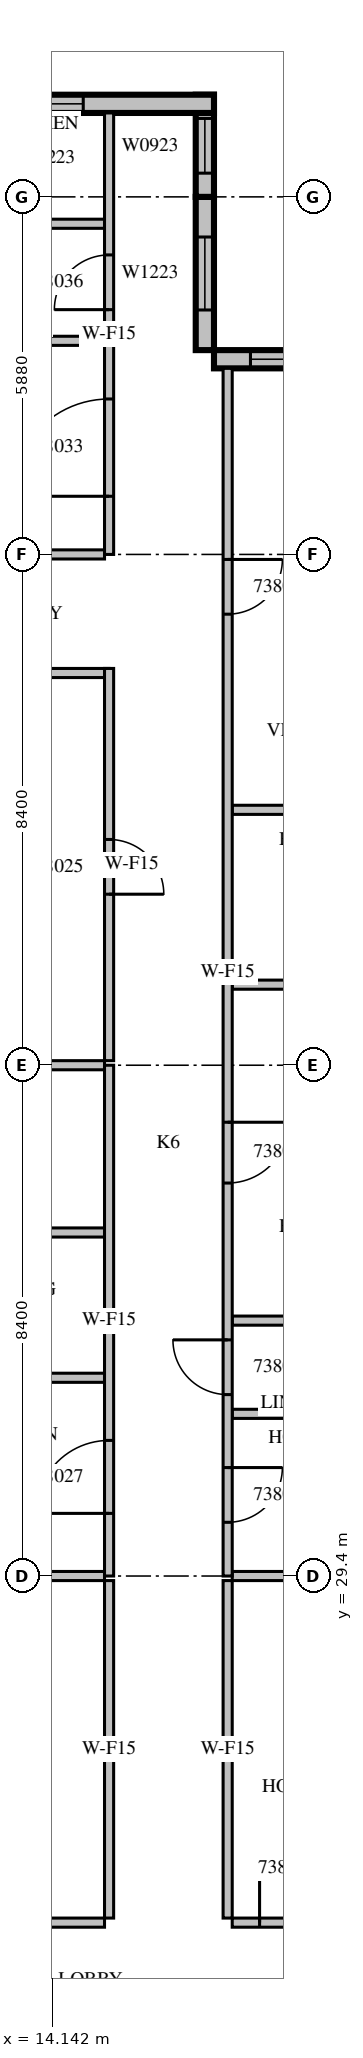
"""IFC4 building model, lengths in metres.
Left out: names, types, materials, properties, quantities, classifications, styles, units other than length and angle.
Written with IfcOpenShell. Run it as: python <this file> out.ifc"""

import sys

from ifc_helpers import new_model, si_unit, direction, frame, frame_2d, origin, place, context, subcontext, project, spatial, rectangle, extrude, source, transform, mapped, element, fill, save


model = new_model("IFC4")
c1 = context("Model", 3, precision=1e-05, world=origin(), true_north=direction((0.0, 1.0)))
c2 = subcontext(c1, "Body", "Model", "MODEL_VIEW")
j1 = project(units=[si_unit("LENGTHUNIT", "METRE"), si_unit("PLANEANGLEUNIT", "RADIAN")], contexts=[c1])
p1 = place(None, origin())
s1 = spatial("IfcSite", under=j1, at=p1, CompositionType="ELEMENT")
p2 = place(p1, origin())
s2 = spatial("IfcBuilding", under=s1, at=p2, CompositionType="ELEMENT")
p3 = place(p2, frame((0.0, 0.0, 177.8)))
s3 = spatial("IfcBuildingStorey", under=s2, at=p3, CompositionType="ELEMENT", Elevation=177.8)
m1 = source(origin(), c2, "Body", "SweptSolid", [
    extrude(rectangle(XDim=4.2, YDim=0.3, at=frame_2d((2.1, 0.0))), origin(), (0.0, 0.0, 1.0), 3.4),
])
p4 = place(p3, frame((21.0, 49.41, 0.0), z_axis=(0.0, 0.0, 1.0), x_axis=(-1.0, 0.0, 0.0)))
e1 = element("IfcWall", 1, at=p4, inside=s3, PredefinedType="STANDARD", context=c2, shape_type="MappedRepresentation", body=[
    mapped(m1, transform((0.0, 0.0, 0.0), scale=1.0)),
])
m2 = source(origin(), c2, "Body", "SweptSolid", [
    extrude(rectangle(XDim=3.0, YDim=2.3, at=frame_2d((1.5, 1.15))), frame((0.0, 0.16, 0.0), z_axis=(0.0, -1.0, 0.0), x_axis=(1.0, 0.0, 0.0)), (0.0, 0.0, 1.0), 0.32),
])
p5 = place(p4, frame((0.6, 0.0, 0.6)))
e2 = element("IfcOpeningElement", 2, at=p5, cuts=e1, PredefinedType="OPENING", context=c2, shape_type="MappedRepresentation", body=[
    mapped(m2, transform((0.0, 0.0, 0.0), scale=1.0)),
])
m3 = source(origin(), c2, "Body", "SweptSolid", [
    extrude(rectangle(XDim=2.52, YDim=0.3, at=frame_2d((1.26, 0.0))), origin(), (0.0, 0.0, 1.0), 3.4),
])
p6 = place(p3, frame((16.65, 49.56, 0.0), z_axis=(0.0, 0.0, 1.0), x_axis=(0.0, 1.0, 0.0)))
e3 = element("IfcWall", 3, at=p6, inside=s3, PredefinedType="STANDARD", context=c2, shape_type="MappedRepresentation", body=[
    mapped(m3, transform((0.0, 0.0, 0.0), scale=1.0)),
])
m4 = source(origin(), c2, "Body", "SweptSolid", [
    extrude(rectangle(XDim=1.2, YDim=2.3, at=frame_2d((0.6, 1.15))), frame((0.0, 0.16, 0.0), z_axis=(0.0, -1.0, 0.0), x_axis=(1.0, 0.0, 0.0)), (0.0, 0.0, 1.0), 0.32),
])
p7 = place(p6, frame((0.66, 0.0, 0.6)))
e4 = element("IfcOpeningElement", 4, at=p7, cuts=e3, PredefinedType="OPENING", context=c2, shape_type="MappedRepresentation", body=[
    mapped(m4, transform((0.0, 0.0, 0.0), scale=1.0)),
])
m5 = source(origin(), c2, "Body", "SweptSolid", [
    extrude(rectangle(XDim=1.68, YDim=0.3, at=frame_2d((0.84, 0.0))), origin(), (0.0, 0.0, 1.0), 3.4),
])
p8 = place(p3, frame((16.65, 52.08, 0.0), z_axis=(0.0, 0.0, 1.0), x_axis=(0.0, 1.0, 0.0)))
e5 = element("IfcWall", 5, at=p8, inside=s3, PredefinedType="STANDARD", context=c2, shape_type="MappedRepresentation", body=[
    mapped(m5, transform((0.0, 0.0, 0.0), scale=1.0)),
])
m6 = source(origin(), c2, "Body", "SweptSolid", [
    extrude(rectangle(XDim=0.9, YDim=2.3, at=frame_2d((0.45, 1.15))), frame((0.0, 0.16, 0.0), z_axis=(0.0, -1.0, 0.0), x_axis=(1.0, 0.0, 0.0)), (0.0, 0.0, 1.0), 0.32),
])
p9 = place(p8, frame((0.39, 0.0, 0.6)))
e6 = element("IfcOpeningElement", 6, at=p9, cuts=e5, PredefinedType="OPENING", context=c2, shape_type="MappedRepresentation", body=[
    mapped(m6, transform((0.0, 0.0, 0.0), scale=1.0)),
])
p10 = place(p3, frame((16.8, 53.61, 0.0), z_axis=(0.0, 0.0, 1.0), x_axis=(-1.0, 0.0, 0.0)))
e7 = element("IfcWall", 7, at=p10, inside=s3, PredefinedType="STANDARD", context=c2, shape_type="SweptSolid", body=[
    extrude(rectangle(XDim=10.5, YDim=0.3, at=frame_2d((5.25, 0.0))), origin(), (0.0, 0.0, 1.0), 3.4),
])
p11 = place(p10, frame((2.15, 0.0, 0.6)))
e8 = element("IfcOpeningElement", 8, at=p11, cuts=e7, PredefinedType="OPENING", context=c2, shape_type="MappedRepresentation", body=[
    mapped(m4, transform((0.0, 0.0, 0.0), scale=1.0)),
])
m7 = source(origin(), c2, "Body", "SweptSolid", [
    extrude(rectangle(XDim=1.8, YDim=2.3, at=frame_2d((0.9, 1.15))), frame((0.0, 0.16, 0.0), z_axis=(0.0, -1.0, 0.0), x_axis=(1.0, 0.0, 0.0)), (0.0, 0.0, 1.0), 0.32),
])
p12 = place(p10, frame((8.025, 0.0, 0.6)))
e9 = element("IfcOpeningElement", 9, at=p12, cuts=e7, PredefinedType="OPENING", context=c2, shape_type="MappedRepresentation", body=[
    mapped(m7, transform((0.0, 0.0, 0.0), scale=1.0)),
])
p13 = place(p3, frame((6.505, 23.7, 0.0), z_axis=(0.0, 0.0, 1.0), x_axis=(1.0, 0.0, 0.0)))
e10 = element("IfcWall", 10, at=p13, inside=s3, PredefinedType="PARTITIONING", context=c2, shape_type="SweptSolid", body=[
    extrude(rectangle(XDim=8.495, YDim=0.15, at=frame_2d((4.247, 0.0))), origin(), (0.0, 0.0, 1.0), 3.4),
])
m8 = source(origin(), c2, "Body", "SweptSolid", [
    extrude(rectangle(XDim=0.9, YDim=2.1, at=frame_2d((0.45, 1.05))), frame((0.0, 0.085, 0.0), z_axis=(0.0, -1.0, 0.0), x_axis=(1.0, 0.0, 0.0)), (0.0, 0.0, 1.0), 0.17),
])
p14 = place(p13, frame((1.395, 0.0, 0.0)))
e11 = element("IfcOpeningElement", 11, at=p14, cuts=e10, PredefinedType="OPENING", context=c2, shape_type="MappedRepresentation", body=[
    mapped(m8, transform((0.0, 0.0, 0.0), scale=1.0)),
])
p15 = place(p13, frame((6.47, 0.0, 0.0)))
e12 = element("IfcOpeningElement", 12, at=p15, cuts=e10, PredefinedType="OPENING", context=c2, shape_type="MappedRepresentation", body=[
    mapped(m8, transform((0.0, 0.0, 0.0), scale=1.0)),
])
m9 = source(origin(), c2, "Body", "SweptSolid", [
    extrude(rectangle(XDim=3.6, YDim=0.15, at=frame_2d((1.8, 0.0))), origin(), (0.0, 0.0, 1.0), 3.4),
])
p16 = place(p3, frame((17.1, 23.7, 0.0), z_axis=(0.0, 0.0, 1.0), x_axis=(1.0, 0.0, 0.0)))
e13 = element("IfcWall", 13, at=p16, inside=s3, PredefinedType="PARTITIONING", context=c2, shape_type="MappedRepresentation", body=[
    mapped(m9, transform((0.0, 0.0, 0.0), scale=1.0)),
])
p17 = place(p16, frame((0.45, 0.0, 0.0)))
e14 = element("IfcOpeningElement", 14, at=p17, cuts=e13, PredefinedType="OPENING", context=c2, shape_type="MappedRepresentation", body=[
    mapped(m8, transform((0.0, 0.0, 0.0), scale=1.0)),
])
m10 = source(origin(), c2, "Body", "SweptSolid", [
    extrude(rectangle(XDim=5.55, YDim=0.15, at=frame_2d((2.775, 0.0))), origin(), (0.0, 0.0, 1.0), 3.4),
])
for number, where, z_axis, x_axis in (
    (15, (15.075, 23.775, 0.0), (0.0, 0.0, 1.0), (0.0, 1.0, 0.0)),
    (16, (17.025, 29.325, 0.0), (0.0, 0.0, 1.0), (0.0, -1.0, 0.0)),
):
    element("IfcWall", number, at=place(p3, frame(where, z_axis=z_axis, x_axis=x_axis)), inside=s3, PredefinedType="PARTITIONING", context=c2, shape_type="MappedRepresentation", body=[
        mapped(m10, transform((0.0, 0.0, 0.0), scale=1.0)),
    ])
m11 = source(origin(), c2, "Body", "SweptSolid", [
    extrude(rectangle(XDim=4.051, YDim=0.15, at=frame_2d((2.026, 0.0))), origin(), (0.0, 0.0, 1.0), 3.4),
])
p18 = place(p3, frame((15.0, 29.4, 0.0), z_axis=(0.0, 0.0, 1.0), x_axis=(-1.0, 0.0, 0.0)))
e17 = element("IfcWall", 17, at=p18, inside=s3, PredefinedType="PARTITIONING", context=c2, shape_type="MappedRepresentation", body=[
    mapped(m11, transform((0.0, 0.0, 0.0), scale=1.0)),
])
m12 = source(origin(), c2, "Body", "SweptSolid", [
    extrude(rectangle(XDim=3.001, YDim=0.15, at=frame_2d((1.5, 0.0))), origin(), (0.0, 0.0, 1.0), 3.4),
])
p19 = place(p3, frame((20.101, 29.4, 0.0), z_axis=(0.0, 0.0, 1.0), x_axis=(-1.0, 0.0, 0.0)))
e18 = element("IfcWall", 18, at=p19, inside=s3, PredefinedType="PARTITIONING", context=c2, shape_type="MappedRepresentation", body=[
    mapped(m12, transform((0.0, 0.0, 0.0), scale=1.0)),
])
p20 = place(p3, frame((15.075, 44.25, 0.0), z_axis=(0.0, 0.0, 1.0), x_axis=(-1.0, 0.0, 0.0)))
e19 = element("IfcWall", 19, at=p20, inside=s3, PredefinedType="PARTITIONING", context=c2, shape_type="SweptSolid", body=[
    extrude(rectangle(XDim=3.575, YDim=0.15, at=frame_2d((1.788, 0.0))), origin(), (0.0, 0.0, 1.0), 3.4),
])
m13 = source(origin(), c2, "Body", "SweptSolid", [
    extrude(rectangle(XDim=6.45, YDim=0.15, at=frame_2d((3.225, 0.0))), origin(), (0.0, 0.0, 1.0), 3.4),
])
p21 = place(p3, frame((15.075, 37.875, 0.0), z_axis=(0.0, 0.0, 1.0), x_axis=(0.0, 1.0, 0.0)))
e20 = element("IfcWall", 20, at=p21, inside=s3, PredefinedType="PARTITIONING", context=c2, shape_type="MappedRepresentation", body=[
    mapped(m13, transform((0.0, 0.0, 0.0), scale=1.0)),
])
p22 = place(p21, frame((2.737, 0.0, 0.0)))
e21 = element("IfcOpeningElement", 21, at=p22, cuts=e20, PredefinedType="OPENING", context=c2, shape_type="MappedRepresentation", body=[
    mapped(m8, transform((0.0, 0.0, 0.0), scale=1.0)),
])
m14 = source(origin(), c2, "Body", "SweptSolid", [
    extrude(rectangle(XDim=3.9, YDim=0.15, at=frame_2d((1.95, 0.0))), origin(), (0.0, 0.0, 1.0), 3.4),
])
for number, where, z_axis, x_axis in (
    (22, (15.0, 32.66, 0.0), (0.0, 0.0, 1.0), (-1.0, 0.0, 0.0)),
    (23, (15.0, 35.049, 0.0), (0.0, 0.0, 1.0), (-1.0, 0.0, 0.0)),
    (24, (15.0, 37.8, 0.0), (0.0, 0.0, 1.0), (-1.0, 0.0, 0.0)),
    (25, (15.0, 49.713, 0.0), (0.0, 0.0, 1.0), (-1.0, 0.0, 0.0)),
):
    element("IfcWall", number, at=place(p3, frame(where, z_axis=z_axis, x_axis=x_axis)), inside=s3, PredefinedType="PARTITIONING", context=c2, shape_type="MappedRepresentation", body=[
        mapped(m14, transform((0.0, 0.0, 0.0), scale=1.0)),
    ])
p23 = place(p3, frame((15.0, 51.638, 0.0), z_axis=(0.0, 0.0, 1.0), x_axis=(-1.0, 0.0, 0.0)))
e26 = element("IfcWall", 26, at=p23, inside=s3, PredefinedType="PARTITIONING", context=c2, shape_type="MappedRepresentation", body=[
    mapped(m14, transform((0.0, 0.0, 0.0), scale=1.0)),
])
p24 = place(p23, frame((1.5, 0.0, 0.0)))
e27 = element("IfcOpeningElement", 27, at=p24, cuts=e26, PredefinedType="OPENING", context=c2, shape_type="MappedRepresentation", body=[
    mapped(m8, transform((0.0, 0.0, 0.0), scale=1.0)),
])
p25 = place(p3, frame((15.0, 46.2, 0.0), z_axis=(0.0, 0.0, 1.0), x_axis=(-1.0, 0.0, 0.0)))
e28 = element("IfcWall", 28, at=p25, inside=s3, PredefinedType="PARTITIONING", context=c2, shape_type="MappedRepresentation", body=[
    mapped(m14, transform((0.0, 0.0, 0.0), scale=1.0)),
])
p26 = place(p3, frame((17.1, 32.067, 0.0), z_axis=(0.0, 0.0, 1.0), x_axis=(1.0, 0.0, 0.0)))
e29 = element("IfcWall", 29, at=p26, inside=s3, PredefinedType="PARTITIONING", context=c2, shape_type="MappedRepresentation", body=[
    mapped(m9, transform((0.0, 0.0, 0.0), scale=1.0)),
])
p27 = place(p3, frame((17.1, 39.125, 0.0), z_axis=(0.0, 0.0, 1.0), x_axis=(1.0, 0.0, 0.0)))
e30 = element("IfcWall", 30, at=p27, inside=s3, PredefinedType="PARTITIONING", context=c2, shape_type="MappedRepresentation", body=[
    mapped(m9, transform((0.0, 0.0, 0.0), scale=1.0)),
])
p28 = place(p27, frame((1.35, 0.0, 0.0)))
e31 = element("IfcOpeningElement", 31, at=p28, cuts=e30, PredefinedType="OPENING", context=c2, shape_type="MappedRepresentation", body=[
    mapped(m8, transform((0.0, 0.0, 0.0), scale=1.0)),
])
for number, where, z_axis, x_axis in (
    (32, (20.7, 33.6, 0.0), (0.0, 0.0, 1.0), (-1.0, 0.0, 0.0)),
    (33, (20.7, 42.0, 0.0), (0.0, 0.0, 1.0), (-1.0, 0.0, 0.0)),
):
    element("IfcWall", number, at=place(p3, frame(where, z_axis=z_axis, x_axis=x_axis)), inside=s3, PredefinedType="PARTITIONING", context=c2, shape_type="MappedRepresentation", body=[
        mapped(m9, transform((0.0, 0.0, 0.0), scale=1.0)),
    ])
m15 = source(origin(), c2, "Body", "SweptSolid", [
    extrude(rectangle(XDim=8.4, YDim=0.15, at=frame_2d((4.2, 0.0))), origin(), (0.0, 0.0, 1.0), 3.4),
])
p29 = place(p3, frame((15.075, 29.4, 0.0), z_axis=(0.0, 0.0, 1.0), x_axis=(0.0, 1.0, 0.0)))
e34 = element("IfcWall", 34, at=p29, inside=s3, PredefinedType="PARTITIONING", context=c2, shape_type="MappedRepresentation", body=[
    mapped(m15, transform((0.0, 0.0, 0.0), scale=1.0)),
])
m16 = source(origin(), c2, "Body", "SweptSolid", [
    extrude(rectangle(XDim=1.2, YDim=2.1, at=frame_2d((0.6, 1.05))), frame((0.0, 0.085, 0.0), z_axis=(0.0, -1.0, 0.0), x_axis=(1.0, 0.0, 0.0)), (0.0, 0.0, 1.0), 0.17),
])
p30 = place(p29, frame((1.03, 0.0, 0.0)))
e35 = element("IfcOpeningElement", 35, at=p30, cuts=e34, PredefinedType="OPENING", context=c2, shape_type="MappedRepresentation", body=[
    mapped(m16, transform((0.0, 0.0, 0.0), scale=1.0)),
])
m17 = source(origin(), c2, "Body", "SweptSolid", [
    extrude(rectangle(XDim=7.26, YDim=0.15, at=frame_2d((3.63, 0.0))), origin(), (0.0, 0.0, 1.0), 3.4),
])
p31 = place(p3, frame((15.075, 46.2, 0.0), z_axis=(0.0, 0.0, 1.0), x_axis=(0.0, 1.0, 0.0)))
e36 = element("IfcWall", 36, at=p31, inside=s3, PredefinedType="PARTITIONING", context=c2, shape_type="MappedRepresentation", body=[
    mapped(m17, transform((0.0, 0.0, 0.0), scale=1.0)),
])
p32 = place(p31, frame((0.956, 0.0, 0.0)))
e37 = element("IfcOpeningElement", 37, at=p32, cuts=e36, PredefinedType="OPENING", context=c2, shape_type="SweptSolid", body=[
    extrude(rectangle(XDim=1.6, YDim=2.1, at=frame_2d((0.8, 1.05))), frame((0.0, 0.085, 0.0), z_axis=(0.0, -1.0, 0.0), x_axis=(1.0, 0.0, 0.0)), (0.0, 0.0, 1.0), 0.17),
])
p33 = place(p31, frame((4.025, 0.0, 0.0)))
e38 = element("IfcOpeningElement", 38, at=p33, cuts=e36, PredefinedType="OPENING", context=c2, shape_type="MappedRepresentation", body=[
    mapped(m8, transform((0.0, 0.0, 0.0), scale=1.0)),
])
p34 = place(p3, frame((17.025, 49.26, 0.0), z_axis=(0.0, 0.0, 1.0), x_axis=(0.0, -1.0, 0.0)))
e39 = element("IfcWall", 39, at=p34, inside=s3, PredefinedType="PARTITIONING", context=c2, shape_type="SweptSolid", body=[
    extrude(rectangle(XDim=19.86, YDim=0.15, at=frame_2d((9.93, 0.0))), origin(), (0.0, 0.0, 1.0), 3.4),
])
p35 = place(p34, frame((18.076, 0.0, 0.0)))
e40 = element("IfcOpeningElement", 40, at=p35, cuts=e39, PredefinedType="OPENING", context=c2, shape_type="MappedRepresentation", body=[
    mapped(m8, transform((0.0, 0.0, 0.0), scale=1.0)),
])
p36 = place(p34, frame((15.976, 0.0, 0.0)))
e41 = element("IfcOpeningElement", 41, at=p36, cuts=e39, PredefinedType="OPENING", context=c2, shape_type="MappedRepresentation", body=[
    mapped(m8, transform((0.0, 0.0, 0.0), scale=1.0)),
])
m18 = source(origin(), c2, "Body", "SweptSolid", [
    extrude(rectangle(XDim=1.0, YDim=2.1, at=frame_2d((0.5, 1.05))), frame((0.0, 0.085, 0.0), z_axis=(0.0, -1.0, 0.0), x_axis=(1.0, 0.0, 0.0)), (0.0, 0.0, 1.0), 0.17),
])
p37 = place(p34, frame((12.398, 0.0, 0.0)))
e42 = element("IfcOpeningElement", 42, at=p37, cuts=e39, PredefinedType="OPENING", context=c2, shape_type="MappedRepresentation", body=[
    mapped(m18, transform((0.0, 0.0, 0.0), scale=1.0)),
])
p38 = place(p34, frame((3.143, 0.0, 0.0)))
e43 = element("IfcOpeningElement", 43, at=p38, cuts=e39, PredefinedType="OPENING", context=c2, shape_type="MappedRepresentation", body=[
    mapped(m8, transform((0.0, 0.0, 0.0), scale=1.0)),
])
m19 = source(origin(), c2, "Body", "SweptSolid", [
    extrude(rectangle(XDim=3.0, YDim=2.3, at=frame_2d((1.5, 1.15))), frame((0.0, 0.03, 0.0), z_axis=(0.0, -1.0, 0.0), x_axis=(1.0, 0.0, 0.0)), (0.0, 0.0, 1.0), 0.06),
])
p39 = place(p5, origin())
e44 = element("IfcWindow", 44, at=p39, inside=s3, PartitioningType="SINGLE_PANEL", PredefinedType="WINDOW", context=c2, shape_type="MappedRepresentation", body=[
    mapped(m19, transform((0.0, 0.0, 0.0), scale=1.0)),
])
fill(e2, e44)
m20 = source(origin(), c2, "Body", "SweptSolid", [
    extrude(rectangle(XDim=1.2, YDim=2.3, at=frame_2d((0.6, 1.15))), frame((0.0, 0.03, 0.0), z_axis=(0.0, -1.0, 0.0), x_axis=(1.0, 0.0, 0.0)), (0.0, 0.0, 1.0), 0.06),
])
p40 = place(p7, origin())
e45 = element("IfcWindow", 45, at=p40, inside=s3, PartitioningType="SINGLE_PANEL", PredefinedType="WINDOW", context=c2, shape_type="MappedRepresentation", body=[
    mapped(m20, transform((0.0, 0.0, 0.0), scale=1.0)),
])
fill(e4, e45)
m21 = source(origin(), c2, "Body", "SweptSolid", [
    extrude(rectangle(XDim=0.9, YDim=2.3, at=frame_2d((0.45, 1.15))), frame((0.0, 0.03, 0.0), z_axis=(0.0, -1.0, 0.0), x_axis=(1.0, 0.0, 0.0)), (0.0, 0.0, 1.0), 0.06),
])
p41 = place(p9, origin())
e46 = element("IfcWindow", 46, at=p41, inside=s3, PartitioningType="SINGLE_PANEL", PredefinedType="WINDOW", context=c2, shape_type="MappedRepresentation", body=[
    mapped(m21, transform((0.0, 0.0, 0.0), scale=1.0)),
])
fill(e6, e46)
p42 = place(p11, origin())
e47 = element("IfcWindow", 47, at=p42, inside=s3, PartitioningType="SINGLE_PANEL", PredefinedType="WINDOW", context=c2, shape_type="MappedRepresentation", body=[
    mapped(m20, transform((0.0, 0.0, 0.0), scale=1.0)),
])
fill(e8, e47)
m22 = source(origin(), c2, "Body", "SweptSolid", [
    extrude(rectangle(XDim=0.9, YDim=2.1, at=frame_2d((0.45, 1.05))), frame((0.0, 0.025, 0.0), z_axis=(0.0, -1.0, 0.0), x_axis=(1.0, 0.0, 0.0)), (0.0, 0.0, 1.0), 0.05),
])
p43 = place(p17, origin())
e48 = element("IfcDoor", 48, at=p43, inside=s3, OperationType="SINGLE_SWING_LEFT", PredefinedType="DOOR", context=c2, shape_type="MappedRepresentation", body=[
    mapped(m22, transform((0.0, 0.0, 0.0), scale=1.0)),
])
fill(e14, e48)
p44 = place(p22, origin())
e49 = element("IfcDoor", 49, at=p44, inside=s3, OperationType="SINGLE_SWING_RIGHT", PredefinedType="DOOR", context=c2, shape_type="MappedRepresentation", body=[
    mapped(m22, transform((0.0, 0.0, 0.0), scale=1.0)),
])
fill(e21, e49)
m23 = source(origin(), c2, "Body", "SweptSolid", [
    extrude(rectangle(XDim=1.2, YDim=2.1, at=frame_2d((0.6, 1.05))), frame((0.0, 0.025, 0.0), z_axis=(0.0, -1.0, 0.0), x_axis=(1.0, 0.0, 0.0)), (0.0, 0.0, 1.0), 0.05),
])
p45 = place(p30, origin())
e50 = element("IfcDoor", 50, at=p45, inside=s3, OperationType="SINGLE_SWING_LEFT", PredefinedType="DOOR", context=c2, shape_type="MappedRepresentation", body=[
    mapped(m23, transform((0.0, 0.0, 0.0), scale=1.0)),
])
fill(e35, e50)
p46 = place(p32, origin())
e51 = element("IfcDoor", 51, at=p46, inside=s3, OperationType="SINGLE_SWING_LEFT", PredefinedType="DOOR", context=c2, shape_type="SweptSolid", body=[
    extrude(rectangle(XDim=1.6, YDim=2.1, at=frame_2d((0.8, 1.05))), frame((0.0, 0.025, 0.0), z_axis=(0.0, -1.0, 0.0), x_axis=(1.0, 0.0, 0.0)), (0.0, 0.0, 1.0), 0.05),
])
fill(e37, e51)
p47 = place(p33, origin())
e52 = element("IfcDoor", 52, at=p47, inside=s3, OperationType="SINGLE_SWING_LEFT", PredefinedType="DOOR", context=c2, shape_type="MappedRepresentation", body=[
    mapped(m22, transform((0.0, 0.0, 0.0), scale=1.0)),
])
fill(e38, e52)
p48 = place(p35, origin())
e53 = element("IfcDoor", 53, at=p48, inside=s3, OperationType="SINGLE_SWING_LEFT", PredefinedType="DOOR", context=c2, shape_type="MappedRepresentation", body=[
    mapped(m22, transform((0.0, 0.0, 0.0), scale=1.0)),
])
fill(e40, e53)
p49 = place(p36, origin())
e54 = element("IfcDoor", 54, at=p49, inside=s3, OperationType="SINGLE_SWING_RIGHT", PredefinedType="DOOR", context=c2, shape_type="MappedRepresentation", body=[
    mapped(m22, transform((0.0, 0.0, 0.0), scale=1.0)),
])
fill(e41, e54)
m24 = source(origin(), c2, "Body", "SweptSolid", [
    extrude(rectangle(XDim=1.0, YDim=2.1, at=frame_2d((0.5, 1.05))), frame((0.0, 0.025, 0.0), z_axis=(0.0, -1.0, 0.0), x_axis=(1.0, 0.0, 0.0)), (0.0, 0.0, 1.0), 0.05),
])
p50 = place(p37, origin())
e55 = element("IfcDoor", 55, at=p50, inside=s3, OperationType="SINGLE_SWING_LEFT", PredefinedType="DOOR", context=c2, shape_type="MappedRepresentation", body=[
    mapped(m24, transform((0.0, 0.0, 0.0), scale=1.0)),
])
fill(e42, e55)
p51 = place(p38, origin())
e56 = element("IfcDoor", 56, at=p51, inside=s3, OperationType="SINGLE_SWING_LEFT", PredefinedType="DOOR", context=c2, shape_type="MappedRepresentation", body=[
    mapped(m22, transform((0.0, 0.0, 0.0), scale=1.0)),
])
fill(e43, e56)
save(model, sys.argv[1])
